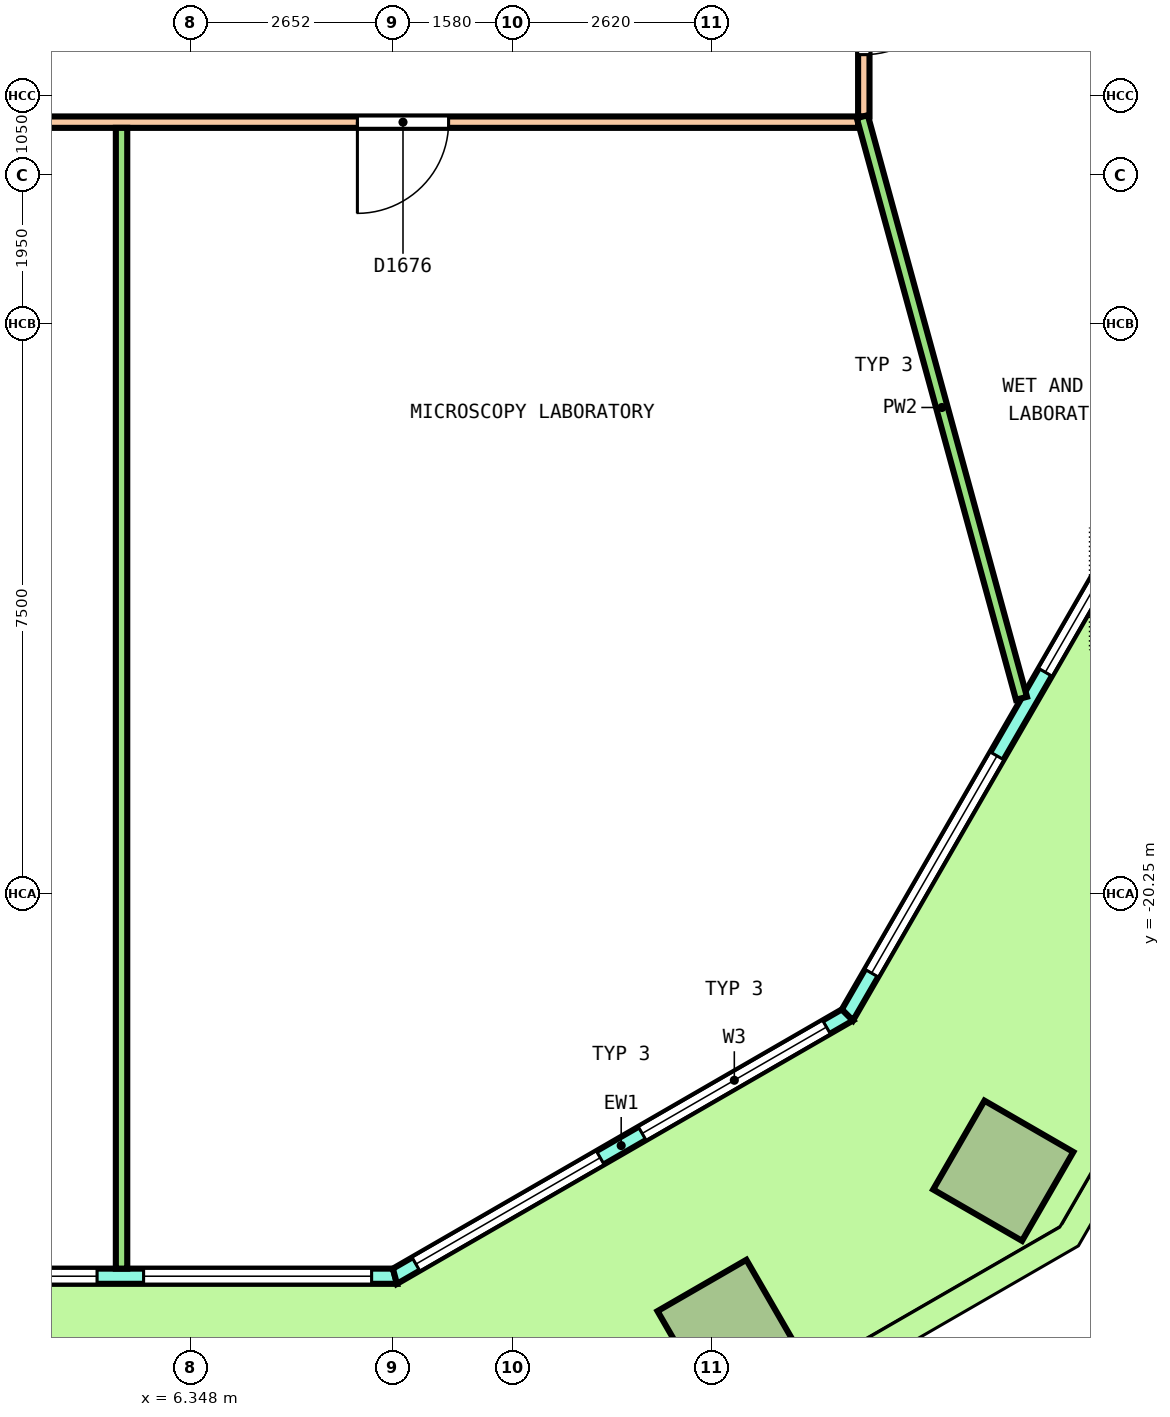
"""IFC4 building model, lengths in metres.
Left out: names, types, materials, properties, quantities, classifications, styles, units other than length and angle.
Written with IfcOpenShell. Run it as: python <this file> out.ifc"""

import sys

from ifc_helpers import new_model, si_unit, direction, frame, frame_2d, origin, origin_2d, place, context, subcontext, project, spatial, polyline, rectangle, outline, extrude, element, fill, save


model = new_model("IFC4")
c1 = context("Model", 3, precision=1e-05, world=origin(), true_north=direction((0.0, 1.0)))
c2 = subcontext(c1, "Body", "Model", "MODEL_VIEW")
j1 = project(units=[si_unit("LENGTHUNIT", "METRE"), si_unit("PLANEANGLEUNIT", "RADIAN")], contexts=[c1])
p1 = place(None, origin())
s1 = spatial("IfcSite", under=j1, at=p1, CompositionType="ELEMENT")
p2 = place(p1, origin())
s2 = spatial("IfcBuilding", under=s1, at=p2, CompositionType="ELEMENT")
p3 = place(p2, frame((0.0, 0.0, 130.8)))
s3 = spatial("IfcBuildingStorey", under=s2, at=p3, CompositionType="ELEMENT", Elevation=130.8)
for number, where, z_axis, x_axis in (
    (1, (13.408, -25.989, 0.0), (0.0, 0.0, 1.0), (0.866, 0.5, 0.0)),
    (2, (17.035, -23.895, 0.0), (0.0, 0.0, 1.0), (0.5, 0.866, 0.0)),
):
    element("IfcColumn", number, at=place(p3, frame(where, z_axis=z_axis, x_axis=x_axis)), inside=s3, PredefinedType="COLUMN", context=c2, shape_type="SweptSolid", body=[
        extrude(rectangle(XDim=1.35, YDim=1.35, at=origin_2d()), origin(), (0.0, 0.0, 1.0), 4.04),
    ])
p4 = place(p3, frame((-9.031, -25.283, 0.0), z_axis=(0.0, 0.0, 1.0), x_axis=(1.0, 0.0, 0.0)))
e3 = element("IfcWall", 3, at=p4, inside=s3, PredefinedType="SOLIDWALL", context=c2, shape_type="SweptSolid", body=[
    extrude(outline(polyline([(-0.027, -0.1), (0.979, -0.1), (1.986, -0.1), (2.992, -0.1), (3.999, -0.1), (5.005, -0.1), (6.012, -0.1), (7.018, -0.1), (8.025, -0.1), (9.031, -0.1), (10.038, -0.1), (11.044, -0.1), (12.051, -0.1), (13.057, -0.1), (14.063, -0.1), (15.07, -0.1), (16.076, -0.1), (17.083, -0.1), (18.089, -0.1), (18.036, 0.1), (17.035, 0.1), (16.035, 0.1), (15.034, 0.1), (14.034, 0.1), (13.033, 0.1), (12.033, 0.1), (11.032, 0.1), (10.032, 0.1), (9.031, 0.1), (8.031, 0.1), (7.03, 0.1), (6.03, 0.1), (5.029, 0.1), (4.029, 0.1), (3.028, 0.1), (2.028, 0.1), (1.027, 0.1), (0.027, 0.1), (-0.027, -0.1)])), origin(), (0.0, 0.0, 1.0), 4.1),
])
p5 = place(p4, frame((0.306, 0.0, 0.1)))
e4 = element("IfcOpeningElement", 4, at=p5, cuts=e3, PredefinedType="OPENING", context=c2, shape_type="SweptSolid", body=[
    extrude(rectangle(XDim=3.0, YDim=2.9, at=frame_2d((1.5, 1.45))), frame((0.0, 0.11, 0.0), z_axis=(0.0, -1.0, 0.0), x_axis=(1.0, 0.0, 0.0)), (0.0, 0.0, 1.0), 0.22),
])
p6 = place(p4, frame((3.919, 0.0, 0.1)))
e5 = element("IfcOpeningElement", 5, at=p6, cuts=e3, PredefinedType="OPENING", context=c2, shape_type="SweptSolid", body=[
    extrude(rectangle(XDim=3.0, YDim=2.9, at=frame_2d((1.5, 1.45))), frame((0.0, 0.11, 0.0), z_axis=(0.0, -1.0, 0.0), x_axis=(1.0, 0.0, 0.0)), (0.0, 0.0, 1.0), 0.22),
])
p7 = place(p4, frame((8.131, 0.0, 0.0)))
e6 = element("IfcOpeningElement", 6, at=p7, cuts=e3, PredefinedType="OPENING", context=c2, shape_type="SweptSolid", body=[
    extrude(rectangle(XDim=1.8, YDim=2.4, at=frame_2d((0.9, 1.2))), frame((0.0, 0.11, 0.0), z_axis=(0.0, -1.0, 0.0), x_axis=(1.0, 0.0, 0.0)), (0.0, 0.0, 1.0), 0.22),
])
p8 = place(p4, frame((8.131, 0.0, 2.55)))
e7 = element("IfcOpeningElement", 7, at=p8, cuts=e3, PredefinedType="OPENING", context=c2, shape_type="SweptSolid", body=[
    extrude(rectangle(XDim=1.8, YDim=0.45, at=frame_2d((0.9, 0.225))), frame((0.0, 0.11, 0.0), z_axis=(0.0, -1.0, 0.0), x_axis=(1.0, 0.0, 0.0)), (0.0, 0.0, 1.0), 0.22),
])
p9 = place(p4, frame((11.144, 0.0, 0.1)))
e8 = element("IfcOpeningElement", 8, at=p9, cuts=e3, PredefinedType="OPENING", context=c2, shape_type="SweptSolid", body=[
    extrude(rectangle(XDim=3.0, YDim=2.9, at=frame_2d((1.5, 1.45))), frame((0.0, 0.11, 0.0), z_axis=(0.0, -1.0, 0.0), x_axis=(1.0, 0.0, 0.0)), (0.0, 0.0, 1.0), 0.22),
])
p10 = place(p4, frame((14.756, 0.0, 0.1)))
e9 = element("IfcOpeningElement", 9, at=p10, cuts=e3, PredefinedType="OPENING", context=c2, shape_type="SweptSolid", body=[
    extrude(rectangle(XDim=3.0, YDim=2.9, at=frame_2d((1.5, 1.45))), frame((0.0, 0.11, 0.0), z_axis=(0.0, -1.0, 0.0), x_axis=(1.0, 0.0, 0.0)), (0.0, 0.0, 1.0), 0.22),
])
p11 = place(p3, frame((9.031, -25.283, 0.0), z_axis=(0.0, 0.0, 1.0), x_axis=(0.866029458321, 0.49999297727, 0.0)))
e10 = element("IfcWall", 10, at=p11, inside=s3, PredefinedType="SOLIDWALL", context=c2, shape_type="SweptSolid", body=[
    extrude(outline(polyline([(-0.027, -0.1), (1.128, -0.1), (2.282, -0.1), (3.437, -0.1), (4.592, -0.1), (5.747, -0.1), (6.901, -0.1), (6.848, 0.1), (5.711, 0.1), (4.574, 0.1), (3.437, 0.1), (2.301, 0.1), (1.164, 0.1), (0.027, 0.1), (-0.027, -0.1)])), origin(), (0.0, 0.0, 1.0), 4.1),
])
p12 = place(p11, frame((0.319, 0.0, 0.1)))
e11 = element("IfcOpeningElement", 11, at=p12, cuts=e10, PredefinedType="OPENING", context=c2, shape_type="SweptSolid", body=[
    extrude(rectangle(XDim=2.8, YDim=2.9, at=frame_2d((1.4, 1.45))), frame((0.0, 0.11, 0.0), z_axis=(0.0, -1.0, 0.0), x_axis=(1.0, 0.0, 0.0)), (0.0, 0.0, 1.0), 0.22),
])
p13 = place(p11, frame((3.756, 0.0, 0.1)))
e12 = element("IfcOpeningElement", 12, at=p13, cuts=e10, PredefinedType="OPENING", context=c2, shape_type="SweptSolid", body=[
    extrude(rectangle(XDim=2.8, YDim=2.9, at=frame_2d((1.4, 1.45))), frame((0.0, 0.11, 0.0), z_axis=(0.0, -1.0, 0.0), x_axis=(1.0, 0.0, 0.0)), (0.0, 0.0, 1.0), 0.22),
])
p14 = place(p3, frame((14.985, -21.845, 0.0), z_axis=(0.0, 0.0, 1.0), x_axis=(0.50000204422, 0.86602422355, 0.0)))
e13 = element("IfcWall", 13, at=p14, inside=s3, PredefinedType="SOLIDWALL", context=c2, shape_type="SweptSolid", body=[
    extrude(outline(polyline([(-0.027, -0.1), (1.014, -0.1), (2.055, -0.1), (3.097, -0.1), (4.138, -0.1), (5.179, -0.1), (6.22, -0.1), (7.261, -0.1), (8.303, -0.1), (9.344, -0.1), (10.385, -0.1), (11.426, -0.1), (12.468, -0.1), (13.509, -0.1), (14.55, -0.1), (15.591, -0.1), (16.632, -0.1), (17.673, -0.1), (18.715, -0.1), (19.756, -0.1), (20.797, -0.1), (21.838, -0.1), (22.879, -0.1), (22.826, 0.1), (21.789, 0.1), (20.753, 0.1), (19.717, 0.1), (18.68, 0.1), (17.644, 0.1), (16.608, 0.1), (15.572, 0.1), (14.535, 0.1), (13.499, 0.1), (12.463, 0.1), (11.426, 0.1), (10.39, 0.1), (9.354, 0.1), (8.317, 0.1), (7.281, 0.1), (6.245, 0.1), (5.208, 0.1), (4.172, 0.1), (3.136, 0.1), (2.099, 0.1), (1.063, 0.1), (0.027, 0.1), (-0.027, -0.1)])), origin(), (0.0, 0.0, 1.0), 4.1),
])
p15 = place(p14, frame((0.635, 0.0, 0.1)))
e14 = element("IfcOpeningElement", 14, at=p15, cuts=e13, PredefinedType="OPENING", context=c2, shape_type="SweptSolid", body=[
    extrude(rectangle(XDim=3.3, YDim=2.9, at=frame_2d((1.65, 1.45))), frame((0.0, 0.11, 0.0), z_axis=(0.0, -1.0, 0.0), x_axis=(1.0, 0.0, 0.0)), (0.0, 0.0, 1.0), 0.22),
])
p16 = place(p14, frame((5.206, 0.0, 0.1)))
e15 = element("IfcOpeningElement", 15, at=p16, cuts=e13, PredefinedType="OPENING", context=c2, shape_type="SweptSolid", body=[
    extrude(rectangle(XDim=3.3, YDim=2.9, at=frame_2d((1.65, 1.45))), frame((0.0, 0.11, 0.0), z_axis=(0.0, -1.0, 0.0), x_axis=(1.0, 0.0, 0.0)), (0.0, 0.0, 1.0), 0.22),
])
p17 = place(p14, frame((10.526, 0.0, 0.0)))
e16 = element("IfcOpeningElement", 16, at=p17, cuts=e13, PredefinedType="OPENING", context=c2, shape_type="SweptSolid", body=[
    extrude(rectangle(XDim=1.8, YDim=2.4, at=frame_2d((0.9, 1.2))), frame((0.0, 0.11, 0.0), z_axis=(0.0, -1.0, 0.0), x_axis=(1.0, 0.0, 0.0)), (0.0, 0.0, 1.0), 0.22),
])
p18 = place(p14, frame((10.526, 0.0, 2.55)))
e17 = element("IfcOpeningElement", 17, at=p18, cuts=e13, PredefinedType="OPENING", context=c2, shape_type="SweptSolid", body=[
    extrude(rectangle(XDim=1.8, YDim=0.45, at=frame_2d((0.9, 0.225))), frame((0.0, 0.11, 0.0), z_axis=(0.0, -1.0, 0.0), x_axis=(1.0, 0.0, 0.0)), (0.0, 0.0, 1.0), 0.22),
])
p19 = place(p14, frame((14.347, 0.0, 0.1)))
e18 = element("IfcOpeningElement", 18, at=p19, cuts=e13, PredefinedType="OPENING", context=c2, shape_type="SweptSolid", body=[
    extrude(rectangle(XDim=3.3, YDim=2.9, at=frame_2d((1.65, 1.45))), frame((0.0, 0.11, 0.0), z_axis=(0.0, -1.0, 0.0), x_axis=(1.0, 0.0, 0.0)), (0.0, 0.0, 1.0), 0.22),
])
p20 = place(p14, frame((18.917, 0.0, 0.1)))
e19 = element("IfcOpeningElement", 19, at=p20, cuts=e13, PredefinedType="OPENING", context=c2, shape_type="SweptSolid", body=[
    extrude(rectangle(XDim=3.3, YDim=2.9, at=frame_2d((1.65, 1.45))), frame((0.0, 0.11, 0.0), z_axis=(0.0, -1.0, 0.0), x_axis=(1.0, 0.0, 0.0)), (0.0, 0.0, 1.0), 0.22),
])
p21 = place(p3, frame((15.2, -10.025, 0.0), z_axis=(0.0, 0.0, 1.0), x_axis=(0.0, 1.0, 0.0)))
e20 = element("IfcWall", 20, at=p21, inside=s3, PredefinedType="PARTITIONING", context=c2, shape_type="SweptSolid", body=[
    extrude(rectangle(XDim=8.75, YDim=0.15, at=frame_2d((4.375, 0.0))), origin(), (0.0, 0.0, 1.0), 3.05),
])
p22 = place(p21, frame((0.813, 0.0, 0.0)))
e21 = element("IfcOpeningElement", 21, at=p22, cuts=e20, PredefinedType="OPENING", context=c2, shape_type="SweptSolid", body=[
    extrude(rectangle(XDim=1.2, YDim=2.1, at=frame_2d((0.6, 1.05))), frame((0.0, 0.085, 0.0), z_axis=(0.0, -1.0, 0.0), x_axis=(1.0, 0.0, 0.0)), (0.0, 0.0, 1.0), 0.17),
])
p23 = place(p3, frame((-15.275, -10.1, 0.0), z_axis=(0.0, 0.0, 1.0), x_axis=(1.0, 0.0, 0.0)))
e22 = element("IfcWall", 22, at=p23, inside=s3, PredefinedType="PARTITIONING", context=c2, shape_type="SweptSolid", body=[
    extrude(rectangle(XDim=30.4, YDim=0.15, at=frame_2d((15.2, 0.0))), origin(), (0.0, 0.0, 1.0), 3.05),
])
p24 = place(p23, frame((1.506, 0.0, 0.0)))
e23 = element("IfcOpeningElement", 23, at=p24, cuts=e22, PredefinedType="OPENING", context=c2, shape_type="SweptSolid", body=[
    extrude(rectangle(XDim=1.0, YDim=2.1, at=frame_2d((0.5, 1.05))), frame((0.0, 0.085, 0.0), z_axis=(0.0, -1.0, 0.0), x_axis=(1.0, 0.0, 0.0)), (0.0, 0.0, 1.0), 0.17),
])
p25 = place(p23, frame((7.84, 0.0, 0.0)))
e24 = element("IfcOpeningElement", 24, at=p25, cuts=e22, PredefinedType="OPENING", context=c2, shape_type="SweptSolid", body=[
    extrude(rectangle(XDim=1.0, YDim=2.1, at=frame_2d((0.5, 1.05))), frame((0.0, 0.085, 0.0), z_axis=(0.0, -1.0, 0.0), x_axis=(1.0, 0.0, 0.0)), (0.0, 0.0, 1.0), 0.17),
])
p26 = place(p23, frame((15.685, 0.0, 0.0)))
e25 = element("IfcOpeningElement", 25, at=p26, cuts=e22, PredefinedType="OPENING", context=c2, shape_type="SweptSolid", body=[
    extrude(rectangle(XDim=1.2, YDim=2.1, at=frame_2d((0.6, 1.05))), frame((0.0, 0.085, 0.0), z_axis=(0.0, -1.0, 0.0), x_axis=(1.0, 0.0, 0.0)), (0.0, 0.0, 1.0), 0.17),
])
p27 = place(p23, frame((23.812, 0.0, 0.0)))
e26 = element("IfcOpeningElement", 26, at=p27, cuts=e22, PredefinedType="OPENING", context=c2, shape_type="SweptSolid", body=[
    extrude(rectangle(XDim=1.2, YDim=2.1, at=frame_2d((0.6, 1.05))), frame((0.0, 0.085, 0.0), z_axis=(0.0, -1.0, 0.0), x_axis=(1.0, 0.0, 0.0)), (0.0, 0.0, 1.0), 0.17),
])
p28 = place(p3, frame((5.435, -25.183, 0.0), z_axis=(0.0, 0.0, 1.0), x_axis=(0.0, 1.0, 0.0)))
e27 = element("IfcWall", 27, at=p28, inside=s3, PredefinedType="PARTITIONING", context=c2, shape_type="SweptSolid", body=[
    extrude(rectangle(XDim=15.008, YDim=0.15, at=frame_2d((7.504, 0.0))), origin(), (0.0, 0.0, 1.0), 3.05),
])
p29 = place(p3, frame((15.18, -10.028, 0.0), z_axis=(0.0, 0.0, 1.0), x_axis=(0.263973985393, -0.964529799973, 0.0)))
e28 = element("IfcWall", 28, at=p29, inside=s3, PredefinedType="PARTITIONING", context=c2, shape_type="SweptSolid", body=[
    extrude(rectangle(XDim=7.934, YDim=0.15, at=frame_2d((3.967, 0.0))), origin(), (0.0, 0.0, 1.0), 3.05),
])
p30 = place(p9, origin())
e29 = element("IfcWindow", 29, at=p30, inside=s3, PartitioningType="SINGLE_PANEL", PredefinedType="WINDOW", context=c2, shape_type="SweptSolid", body=[
    extrude(rectangle(XDim=3.0, YDim=2.9, at=frame_2d((1.5, 1.45))), frame((0.0, 0.03, 0.0), z_axis=(0.0, -1.0, 0.0), x_axis=(1.0, 0.0, 0.0)), (0.0, 0.0, 1.0), 0.06),
])
fill(e8, e29)
p31 = place(p10, origin())
e30 = element("IfcWindow", 30, at=p31, inside=s3, PartitioningType="SINGLE_PANEL", PredefinedType="WINDOW", context=c2, shape_type="SweptSolid", body=[
    extrude(rectangle(XDim=3.0, YDim=2.9, at=frame_2d((1.5, 1.45))), frame((0.0, 0.03, 0.0), z_axis=(0.0, -1.0, 0.0), x_axis=(1.0, 0.0, 0.0)), (0.0, 0.0, 1.0), 0.06),
])
fill(e9, e30)
p32 = place(p12, origin())
e31 = element("IfcWindow", 31, at=p32, inside=s3, PartitioningType="SINGLE_PANEL", PredefinedType="WINDOW", context=c2, shape_type="SweptSolid", body=[
    extrude(rectangle(XDim=2.8, YDim=2.9, at=frame_2d((1.4, 1.45))), frame((0.0, 0.03, 0.0), z_axis=(0.0, -1.0, 0.0), x_axis=(1.0, 0.0, 0.0)), (0.0, 0.0, 1.0), 0.06),
])
fill(e11, e31)
p33 = place(p13, origin())
e32 = element("IfcWindow", 32, at=p33, inside=s3, PartitioningType="SINGLE_PANEL", PredefinedType="WINDOW", context=c2, shape_type="SweptSolid", body=[
    extrude(rectangle(XDim=2.8, YDim=2.9, at=frame_2d((1.4, 1.45))), frame((0.0, 0.03, 0.0), z_axis=(0.0, -1.0, 0.0), x_axis=(1.0, 0.0, 0.0)), (0.0, 0.0, 1.0), 0.06),
])
fill(e12, e32)
p34 = place(p15, origin())
e33 = element("IfcWindow", 33, at=p34, inside=s3, PartitioningType="SINGLE_PANEL", PredefinedType="WINDOW", context=c2, shape_type="SweptSolid", body=[
    extrude(rectangle(XDim=3.3, YDim=2.9, at=frame_2d((1.65, 1.45))), frame((0.0, 0.03, 0.0), z_axis=(0.0, -1.0, 0.0), x_axis=(1.0, 0.0, 0.0)), (0.0, 0.0, 1.0), 0.06),
])
fill(e14, e33)
p35 = place(p16, origin())
e34 = element("IfcWindow", 34, at=p35, inside=s3, PartitioningType="SINGLE_PANEL", PredefinedType="WINDOW", context=c2, shape_type="SweptSolid", body=[
    extrude(rectangle(XDim=3.3, YDim=2.9, at=frame_2d((1.65, 1.45))), frame((0.0, 0.03, 0.0), z_axis=(0.0, -1.0, 0.0), x_axis=(1.0, 0.0, 0.0)), (0.0, 0.0, 1.0), 0.06),
])
fill(e15, e34)
p36 = place(p27, origin())
e35 = element("IfcDoor", 35, at=p36, inside=s3, OperationType="DOUBLE_DOOR_SINGLE_SWING", PredefinedType="DOOR", context=c2, shape_type="SweptSolid", body=[
    extrude(rectangle(XDim=1.2, YDim=2.1, at=frame_2d((0.6, 1.05))), frame((0.0, 0.025, 0.0), z_axis=(0.0, -1.0, 0.0), x_axis=(1.0, 0.0, 0.0)), (0.0, 0.0, 1.0), 0.05),
])
fill(e26, e35)
p37 = place(p22, origin())
e36 = element("IfcDoor", 36, at=p37, inside=s3, OperationType="DOUBLE_DOOR_SINGLE_SWING", PredefinedType="DOOR", context=c2, shape_type="SweptSolid", body=[
    extrude(rectangle(XDim=1.2, YDim=2.1, at=frame_2d((0.6, 1.05))), frame((0.0, 0.025, 0.0), z_axis=(0.0, -1.0, 0.0), x_axis=(1.0, 0.0, 0.0)), (0.0, 0.0, 1.0), 0.05),
])
fill(e21, e36)
save(model, sys.argv[1])
